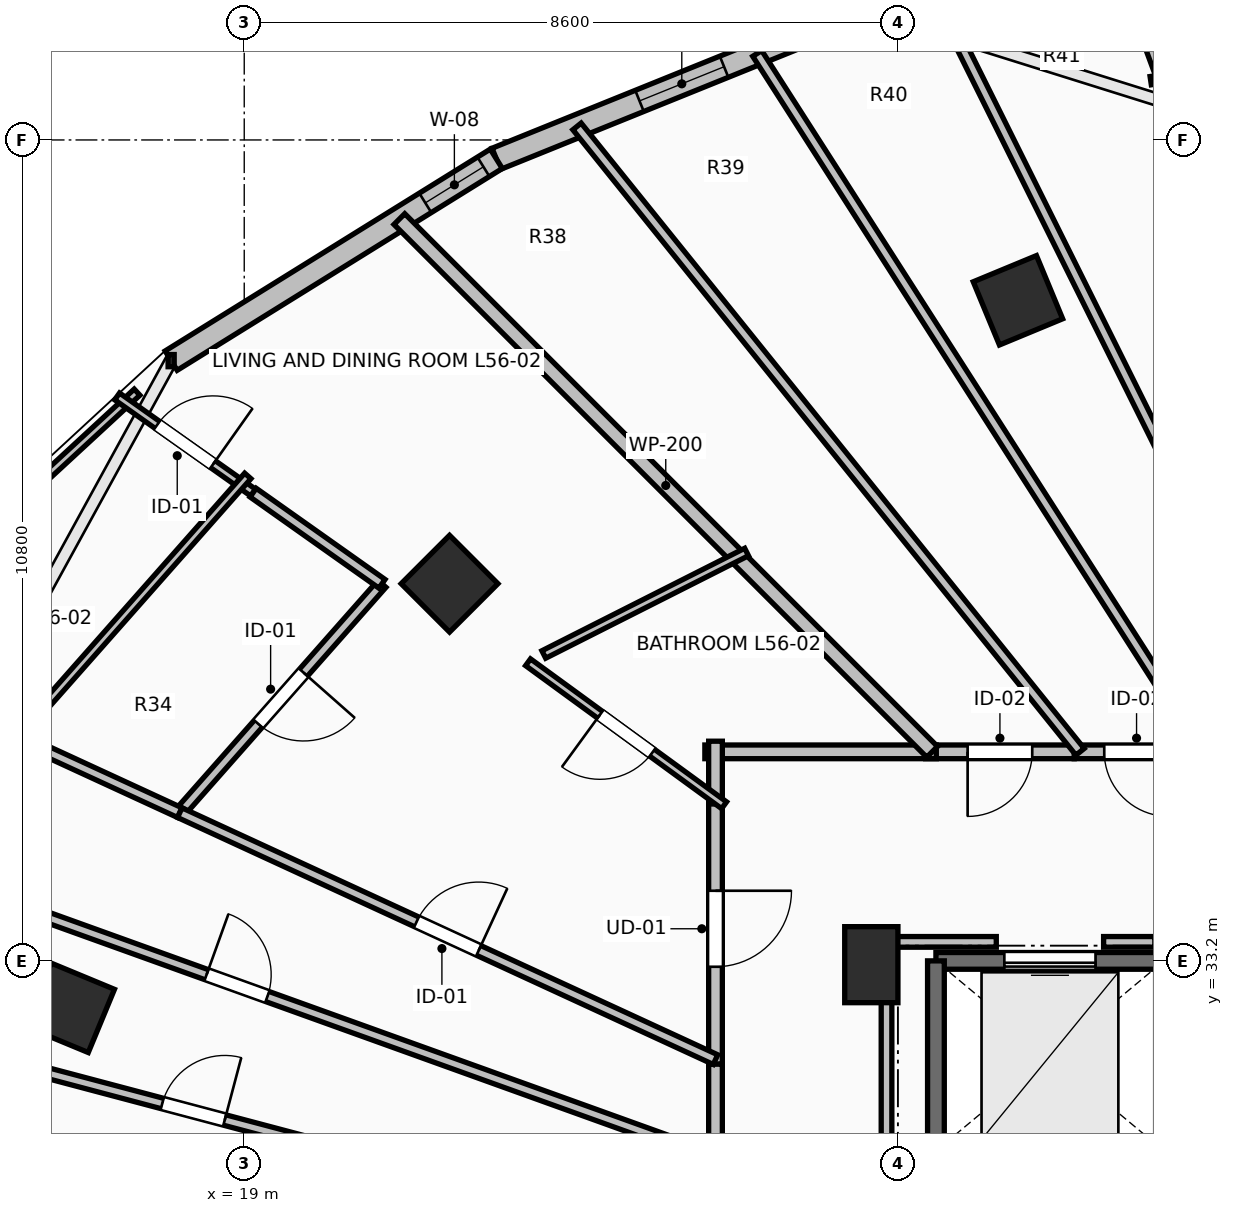
"""IFC4 building model, lengths in metres.
Left out: names, types, materials, properties, quantities, classifications, styles, units other than length and angle.
Written with IfcOpenShell. Run it as: python <this file> out.ifc"""

import sys

from ifc_helpers import new_model, si_unit, direction, frame, frame_2d, origin, origin_2d, place, context, subcontext, project, spatial, rectangle, extrude, element, fill, save


model = new_model("IFC4")
c1 = context("Model", 3, precision=1e-05, world=origin(), true_north=direction((0.0, 1.0)))
c2 = subcontext(c1, "Body", "Model", "MODEL_VIEW")
j1 = project(units=[si_unit("LENGTHUNIT", "METRE"), si_unit("PLANEANGLEUNIT", "RADIAN")], contexts=[c1])
p1 = place(None, origin())
s1 = spatial("IfcSite", under=j1, at=p1, CompositionType="ELEMENT")
p2 = place(p1, origin())
s2 = spatial("IfcBuilding", under=s1, at=p2, CompositionType="ELEMENT")
p3 = place(p2, frame((0.0, 0.0, 207.2)))
s3 = spatial("IfcBuildingStorey", under=s2, at=p3, CompositionType="ELEMENT", Elevation=207.2)
for number, where, z_axis, x_axis in (
    (1, (29.179, 41.891, 0.0), (0.0, 0.0, 1.0), (-0.383, 0.924, 0.0)),
    (2, (21.701, 38.162, 0.0), (0.0, 0.0, 1.0), (-0.707, 0.707, 0.0)),
    (3, (16.705, 32.582, 0.0), (0.0, 0.0, 1.0), (-0.924, 0.383, 0.0)),
):
    element("IfcColumn", number, at=place(p3, frame(where, z_axis=z_axis, x_axis=x_axis)), inside=s3, PredefinedType="COLUMN", context=c2, shape_type="SweptSolid", body=[
        extrude(rectangle(XDim=0.9, YDim=0.9, at=origin_2d()), origin(), (0.0, 0.0, 1.0), 3.55),
    ])
p4 = place(p3, frame((27.25, 33.15, 0.0), z_axis=(0.0, 0.0, 1.0), x_axis=(1.0, 0.0, 0.0)))
e4 = element("IfcColumn", 4, at=p4, inside=s3, PredefinedType="PILASTER", context=c2, shape_type="SweptSolid", body=[
    extrude(rectangle(XDim=0.7, YDim=1.0, at=origin_2d()), origin(), (0.0, 0.0, 1.0), 3.55),
])
p5 = place(p3, frame((27.197, 45.725, 0.0), z_axis=(0.0, 0.0, 1.0), x_axis=(-0.927111094334, -0.374786630981, 0.0)))
e5 = element("IfcWall", 5, at=p5, inside=s3, PredefinedType="STANDARD", context=c2, shape_type="SweptSolid", body=[
    extrude(rectangle(XDim=5.264, YDim=0.3, at=frame_2d((2.632, 0.0))), origin(), (0.0, 0.0, 1.0), 3.29),
])
p6 = place(p5, frame((0.258, 0.0, 0.85)))
e6 = element("IfcOpeningElement", 6, at=p6, cuts=e5, PredefinedType="OPENING", context=c2, shape_type="SweptSolid", body=[
    extrude(rectangle(XDim=0.9, YDim=1.8, at=frame_2d((0.45, 0.9))), frame((0.0, 0.165, 0.0), z_axis=(0.0, -1.0, 0.0), x_axis=(1.0, 0.0, 0.0)), (0.0, 0.0, 1.0), 0.33),
])
p7 = place(p5, frame((2.032, 0.0, 0.85)))
e7 = element("IfcOpeningElement", 7, at=p7, cuts=e5, PredefinedType="OPENING", context=c2, shape_type="SweptSolid", body=[
    extrude(rectangle(XDim=1.2, YDim=1.95, at=frame_2d((0.6, 0.975))), frame((0.0, 0.165, 0.0), z_axis=(0.0, -1.0, 0.0), x_axis=(1.0, 0.0, 0.0)), (0.0, 0.0, 1.0), 0.33),
])
p8 = place(p3, frame((22.316, 43.752, 0.0), z_axis=(0.0, 0.0, 1.0), x_axis=(-0.849647657754, -0.527350791858, 0.0)))
e8 = element("IfcWall", 8, at=p8, inside=s3, PredefinedType="STANDARD", context=c2, shape_type="SweptSolid", body=[
    extrude(rectangle(XDim=5.035, YDim=0.3, at=frame_2d((2.518, 0.0))), origin(), (0.0, 0.0, 1.0), 3.29),
])
p9 = place(p8, frame((0.199, 0.0, 0.85)))
e9 = element("IfcOpeningElement", 9, at=p9, cuts=e8, PredefinedType="OPENING", context=c2, shape_type="SweptSolid", body=[
    extrude(rectangle(XDim=0.9, YDim=1.8, at=frame_2d((0.45, 0.9))), frame((0.0, 0.165, 0.0), z_axis=(0.0, -1.0, 0.0), x_axis=(1.0, 0.0, 0.0)), (0.0, 0.0, 1.0), 0.33),
])
p10 = place(p3, frame((31.1, 33.2, 0.0), z_axis=(0.0, 0.0, 1.0), x_axis=(-1.0, 0.0, 0.0)))
e10 = element("IfcWall", 10, at=p10, inside=s3, PredefinedType="SOLIDWALL", context=c2, shape_type="SweptSolid", body=[
    extrude(rectangle(XDim=3.0, YDim=0.22, at=frame_2d((1.5, 0.0))), origin(), (0.0, 0.0, 1.0), 3.29),
])
p11 = place(p10, frame((0.9, 0.0, 0.0)))
e11 = element("IfcOpeningElement", 11, at=p11, cuts=e10, PredefinedType="OPENING", context=c2, shape_type="SweptSolid", body=[
    extrude(rectangle(XDim=1.2, YDim=2.2, at=frame_2d((0.6, 1.1))), frame((0.0, 0.125, 0.0), z_axis=(0.0, -1.0, 0.0), x_axis=(1.0, 0.0, 0.0)), (0.0, 0.0, 1.0), 0.25),
])
p12 = place(p3, frame((28.1, 33.2, 0.0), z_axis=(0.0, 0.0, 1.0), x_axis=(0.0, -1.0, 0.0)))
e12 = element("IfcWall", 12, at=p12, inside=s3, PredefinedType="SOLIDWALL", context=c2, shape_type="SweptSolid", body=[
    extrude(rectangle(XDim=2.5, YDim=0.22, at=frame_2d((1.25, 0.0))), origin(), (0.0, 0.0, 1.0), 3.29),
])
p13 = place(p3, frame((31.56, 35.95, 0.0), z_axis=(0.0, 0.0, 1.0), x_axis=(-1.0, 0.0, 0.0)))
e13 = element("IfcWall", 13, at=p13, inside=s3, PredefinedType="PARTITIONING", context=c2, shape_type="SweptSolid", body=[
    extrude(rectangle(XDim=1.641, YDim=0.18, at=frame_2d((0.821, 0.0))), origin(), (0.0, 0.0, 1.0), 2.482),
])
p14 = place(p13, frame((0.396, 0.0, 0.0)))
e14 = element("IfcOpeningElement", 14, at=p14, cuts=e13, PredefinedType="OPENING", context=c2, shape_type="SweptSolid", body=[
    extrude(rectangle(XDim=0.85, YDim=2.1, at=frame_2d((0.425, 1.05))), frame((0.0, 0.105, 0.0), z_axis=(0.0, -1.0, 0.0), x_axis=(1.0, 0.0, 0.0)), (0.0, 0.0, 1.0), 0.21),
])
p15 = place(p3, frame((29.919, 35.95, 0.0), z_axis=(0.0, 0.0, 1.0), x_axis=(-1.0, 0.0, 0.0)))
e15 = element("IfcWall", 15, at=p15, inside=s3, PredefinedType="PARTITIONING", context=c2, shape_type="SweptSolid", body=[
    extrude(rectangle(XDim=1.954, YDim=0.18, at=frame_2d((0.977, 0.0))), origin(), (0.0, 0.0, 1.0), 2.482),
])
p16 = place(p15, frame((0.552, 0.0, 0.0)))
e16 = element("IfcOpeningElement", 16, at=p16, cuts=e15, PredefinedType="OPENING", context=c2, shape_type="SweptSolid", body=[
    extrude(rectangle(XDim=0.85, YDim=2.1, at=frame_2d((0.425, 1.05))), frame((0.0, 0.105, 0.0), z_axis=(0.0, -1.0, 0.0), x_axis=(1.0, 0.0, 0.0)), (0.0, 0.0, 1.0), 0.21),
])
p17 = place(p3, frame((25.2, 35.404, 0.0), z_axis=(0.0, 0.0, 1.0), x_axis=(0.0, -1.0, 0.0)))
e17 = element("IfcWall", 17, at=p17, inside=s3, PredefinedType="PARTITIONING", context=c2, shape_type="SweptSolid", body=[
    extrude(rectangle(XDim=3.563, YDim=0.18, at=frame_2d((1.781, 0.0))), origin(), (0.0, 0.0, 1.0), 2.482),
])
p18 = place(p17, frame((1.281, 0.0, 0.0)))
e18 = element("IfcOpeningElement", 18, at=p18, cuts=e17, PredefinedType="OPENING", context=c2, shape_type="SweptSolid", body=[
    extrude(rectangle(XDim=1.0, YDim=2.15, at=frame_2d((0.5, 1.075))), frame((0.0, 0.105, 0.0), z_axis=(0.0, -1.0, 0.0), x_axis=(1.0, 0.0, 0.0)), (0.0, 0.0, 1.0), 0.21),
])
p19 = place(p3, frame((28.105, 35.95, 0.0), z_axis=(0.0, 0.0, 1.0), x_axis=(-1.0, 0.0, 0.0)))
e19 = element("IfcWall", 19, at=p19, inside=s3, PredefinedType="PARTITIONING", context=c2, shape_type="SweptSolid", body=[
    extrude(rectangle(XDim=3.045, YDim=0.18, at=frame_2d((1.522, 0.0))), origin(), (0.0, 0.0, 1.0), 2.482),
])
p20 = place(p3, frame((25.2, 36.09, 0.0), z_axis=(0.0, 0.0, 1.0), x_axis=(0.0, -1.0, 0.0)))
e20 = element("IfcWall", 20, at=p20, inside=s3, PredefinedType="PARTITIONING", context=c2, shape_type="SweptSolid", body=[
    extrude(rectangle(XDim=0.826, YDim=0.18, at=frame_2d((0.413, 0.0))), origin(), (0.0, 0.0, 1.0), 2.482),
])
p21 = place(p3, frame((25.2, 31.841, 0.0), z_axis=(0.0, 0.0, 1.0), x_axis=(0.0, -1.0, 0.0)))
e21 = element("IfcWall", 21, at=p21, inside=s3, PredefinedType="PARTITIONING", context=c2, shape_type="SweptSolid", body=[
    extrude(rectangle(XDim=1.293, YDim=0.18, at=frame_2d((0.646, 0.0))), origin(), (0.0, 0.0, 1.0), 3.29),
])
p22 = place(p3, frame((34.824, 45.367, 0.0), z_axis=(0.0, 0.0, 1.0), x_axis=(-0.988877230123, -0.148734070555, 0.0)))
e22 = element("IfcWall", 22, at=p22, inside=s3, PredefinedType="PARTITIONING", context=c2, shape_type="SweptSolid", body=[
    extrude(rectangle(XDim=3.943, YDim=0.11, at=frame_2d((1.971, 0.0))), origin(), (0.0, 0.0, 1.0), 3.29),
])
p23 = place(p22, frame((1.521, 0.0, 0.0)))
e23 = element("IfcOpeningElement", 23, at=p23, cuts=e22, PredefinedType="OPENING", context=c2, shape_type="SweptSolid", body=[
    extrude(rectangle(XDim=0.9, YDim=2.1, at=frame_2d((0.45, 1.05))), frame((0.0, 0.07, 0.0), z_axis=(0.0, -1.0, 0.0), x_axis=(1.0, 0.0, 0.0)), (0.0, 0.0, 1.0), 0.14),
])
p24 = place(p3, frame((31.113, 44.67, 0.0), z_axis=(0.0, 0.0, 1.0), x_axis=(-0.346337161188, 0.938110105894, 0.0)))
e24 = element("IfcWall", 24, at=p24, inside=s3, PredefinedType="PARTITIONING", context=c2, shape_type="SweptSolid", body=[
    extrude(rectangle(XDim=2.059, YDim=0.11, at=frame_2d((1.03, 0.0))), origin(), (0.0, 0.0, 1.0), 3.29),
])
p25 = place(p3, frame((28.091, 45.928, 0.0), z_axis=(0.0, 0.0, 1.0), x_axis=(0.445267068418, -0.895397809793, 0.0)))
e25 = element("IfcWall", 25, at=p25, inside=s3, PredefinedType="PARTITIONING", context=c2, shape_type="SweptSolid", body=[
    extrude(rectangle(XDim=11.144, YDim=0.14, at=frame_2d((5.572, 0.0))), origin(), (0.0, 0.0, 1.0), 2.482),
])
p26 = place(p3, frame((25.749, 45.138, 0.0), z_axis=(0.0, 0.0, 1.0), x_axis=(0.539168632786, -0.842197830335, 0.0)))
e26 = element("IfcWall", 26, at=p26, inside=s3, PredefinedType="PARTITIONING", context=c2, shape_type="SweptSolid", body=[
    extrude(rectangle(XDim=10.909, YDim=0.14, at=frame_2d((5.455, 0.0))), origin(), (0.0, 0.0, 1.0), 2.482),
])
p27 = place(p3, frame((23.378, 44.178, 0.0), z_axis=(0.0, 0.0, 1.0), x_axis=(0.626756813732, -0.779214923137, 0.0)))
e27 = element("IfcWall", 27, at=p27, inside=s3, PredefinedType="PARTITIONING", context=c2, shape_type="SweptSolid", body=[
    extrude(rectangle(XDim=10.559, YDim=0.14, at=frame_2d((5.28, 0.0))), origin(), (0.0, 0.0, 1.0), 2.482),
])
p28 = place(p3, frame((21.041, 42.959, 0.0), z_axis=(0.0, 0.0, 1.0), x_axis=(0.707106781187, -0.707106781187, 0.0)))
e28 = element("IfcWall", 28, at=p28, inside=s3, PredefinedType="PARTITIONING", context=c2, shape_type="SweptSolid", body=[
    extrude(rectangle(XDim=9.912, YDim=0.2, at=frame_2d((4.956, 0.0))), origin(), (0.0, 0.0, 1.0), 2.482),
])
p29 = place(p3, frame((25.313, 35.248, 0.0), z_axis=(0.0, 0.0, 1.0), x_axis=(-0.807968083988, 0.58922625133, 0.0)))
e29 = element("IfcWall", 29, at=p29, inside=s3, PredefinedType="PARTITIONING", context=c2, shape_type="SweptSolid", body=[
    extrude(rectangle(XDim=3.192, YDim=0.11, at=frame_2d((1.596, 0.0))), origin(), (0.0, 0.0, 1.0), 2.482),
])
p30 = place(p29, frame((1.171, 0.0, 0.0)))
e30 = element("IfcOpeningElement", 30, at=p30, cuts=e29, PredefinedType="OPENING", context=c2, shape_type="SweptSolid", body=[
    extrude(rectangle(XDim=0.85, YDim=2.1, at=frame_2d((0.425, 1.05))), frame((0.0, 0.07, 0.0), z_axis=(0.0, -1.0, 0.0), x_axis=(1.0, 0.0, 0.0)), (0.0, 0.0, 1.0), 0.14),
])
p31 = place(p3, frame((22.941, 37.231, 0.0), z_axis=(0.0, 0.0, 1.0), x_axis=(0.892507731149, 0.451032094024, 0.0)))
e31 = element("IfcWall", 31, at=p31, inside=s3, PredefinedType="PARTITIONING", context=c2, shape_type="SweptSolid", body=[
    extrude(rectangle(XDim=2.989, YDim=0.11, at=frame_2d((1.495, 0.0))), origin(), (0.0, 0.0, 1.0), 2.482),
])
p32 = place(p3, frame((17.59, 40.682, 0.0), z_axis=(0.0, 0.0, 1.0), x_axis=(-0.734861902375, -0.678216768031, 0.0)))
e32 = element("IfcWall", 32, at=p32, inside=s3, PredefinedType="PARTITIONING", context=c2, shape_type="SweptSolid", body=[
    extrude(rectangle(XDim=4.323, YDim=0.11, at=frame_2d((2.162, 0.0))), origin(), (0.0, 0.0, 1.0), 3.29),
])
p33 = place(p3, frame((17.328, 40.626, 0.0), z_axis=(0.0, 0.0, 1.0), x_axis=(0.816448938693, -0.577417639588, 0.0)))
e33 = element("IfcWall", 33, at=p33, inside=s3, PredefinedType="PARTITIONING", context=c2, shape_type="SweptSolid", body=[
    extrude(rectangle(XDim=2.192, YDim=0.11, at=frame_2d((1.096, 0.0))), origin(), (0.0, 0.0, 1.0), 3.29),
])
p34 = place(p33, frame((0.646, 0.0, 0.0)))
e34 = element("IfcOpeningElement", 34, at=p34, cuts=e33, PredefinedType="OPENING", context=c2, shape_type="SweptSolid", body=[
    extrude(rectangle(XDim=0.9, YDim=2.1, at=frame_2d((0.45, 1.05))), frame((0.0, 0.07, 0.0), z_axis=(0.0, -1.0, 0.0), x_axis=(1.0, 0.0, 0.0)), (0.0, 0.0, 1.0), 0.14),
])
p35 = place(p3, frame((20.812, 38.161, 0.0), z_axis=(0.0, 0.0, 1.0), x_axis=(-0.662063683649, -0.749447582418, 0.0)))
e35 = element("IfcWall", 35, at=p35, inside=s3, PredefinedType="PARTITIONING", context=c2, shape_type="SweptSolid", body=[
    extrude(rectangle(XDim=4.018, YDim=0.14, at=frame_2d((2.009, 0.0))), origin(), (0.0, 0.0, 1.0), 3.29),
])
p36 = place(p35, frame((1.559, 0.0, 0.0)))
e36 = element("IfcOpeningElement", 36, at=p36, cuts=e35, PredefinedType="OPENING", context=c2, shape_type="SweptSolid", body=[
    extrude(rectangle(XDim=0.9, YDim=2.1, at=frame_2d((0.45, 1.05))), frame((0.0, 0.085, 0.0), z_axis=(0.0, -1.0, 0.0), x_axis=(1.0, 0.0, 0.0)), (0.0, 0.0, 1.0), 0.17),
])
p37 = place(p3, frame((18.152, 35.15, 0.0), z_axis=(0.0, 0.0, 1.0), x_axis=(-0.908192094718, 0.418553603607, 0.0)))
e37 = element("IfcWall", 37, at=p37, inside=s3, PredefinedType="PARTITIONING", context=c2, shape_type="SweptSolid", body=[
    extrude(rectangle(XDim=2.363, YDim=0.14, at=frame_2d((1.182, 0.0))), origin(), (0.0, 0.0, 1.0), 3.29),
])
p38 = place(p3, frame((19.117, 39.36, 0.0), z_axis=(0.0, 0.0, 1.0), x_axis=(0.816315567802, -0.577606175316, 0.0)))
e38 = element("IfcWall", 38, at=p38, inside=s3, PredefinedType="PARTITIONING", context=c2, shape_type="SweptSolid", body=[
    extrude(rectangle(XDim=2.076, YDim=0.14, at=frame_2d((1.038, 0.0))), origin(), (0.0, 0.0, 1.0), 3.29),
])
p39 = place(p3, frame((18.152, 35.15, 0.0), z_axis=(0.0, 0.0, 1.0), x_axis=(0.908152637685, -0.418639208227, 0.0)))
e39 = element("IfcWall", 39, at=p39, inside=s3, PredefinedType="PARTITIONING", context=c2, shape_type="SweptSolid", body=[
    extrude(rectangle(XDim=7.761, YDim=0.14, at=frame_2d((3.88, 0.0))), origin(), (0.0, 0.0, 1.0), 2.824),
])
p40 = place(p39, frame((3.43, 0.0, 0.0)))
e40 = element("IfcOpeningElement", 40, at=p40, cuts=e39, PredefinedType="OPENING", context=c2, shape_type="SweptSolid", body=[
    extrude(rectangle(XDim=0.9, YDim=2.1, at=frame_2d((0.45, 1.05))), frame((0.0, 0.085, 0.0), z_axis=(0.0, -1.0, 0.0), x_axis=(1.0, 0.0, 0.0)), (0.0, 0.0, 1.0), 0.17),
])
p41 = place(p3, frame((15.913, 36.034, 0.0), z_axis=(0.0, 0.0, 1.0), x_axis=(0.662189711464, 0.749336230294, 0.0)))
e41 = element("IfcWall", 41, at=p41, inside=s3, PredefinedType="PARTITIONING", context=c2, shape_type="SweptSolid", body=[
    extrude(rectangle(XDim=4.732, YDim=0.11, at=frame_2d((2.366, 0.0))), origin(), (0.0, 0.0, 1.0), 3.29),
])
p42 = place(p3, frame((12.609, 35.141, 0.0), z_axis=(0.0, 0.0, 1.0), x_axis=(0.940877411069, -0.338747246985, 0.0)))
e42 = element("IfcWall", 42, at=p42, inside=s3, PredefinedType="PARTITIONING", context=c2, shape_type="SweptSolid", body=[
    extrude(rectangle(XDim=13.382, YDim=0.14, at=frame_2d((6.691, 0.0))), origin(), (0.0, 0.0, 1.0), 2.824),
])
p43 = place(p42, frame((6.266, 0.0, 0.0)))
e43 = element("IfcOpeningElement", 43, at=p43, cuts=e42, PredefinedType="OPENING", context=c2, shape_type="SweptSolid", body=[
    extrude(rectangle(XDim=0.85, YDim=2.1, at=frame_2d((0.425, 1.05))), frame((0.0, 0.085, 0.0), z_axis=(0.0, -1.0, 0.0), x_axis=(1.0, 0.0, 0.0)), (0.0, 0.0, 1.0), 0.17),
])
p44 = place(p3, frame((11.465, 33.036, 0.0), z_axis=(0.0, 0.0, 1.0), x_axis=(0.966598137313, -0.256296782934, 0.0)))
e44 = element("IfcWall", 44, at=p44, inside=s3, PredefinedType="PARTITIONING", context=c2, shape_type="SweptSolid", body=[
    extrude(rectangle(XDim=14.209, YDim=0.14, at=frame_2d((7.105, 0.0))), origin(), (0.0, 0.0, 1.0), 2.482),
])
p45 = place(p44, frame((6.68, 0.0, 0.0)))
e45 = element("IfcOpeningElement", 45, at=p45, cuts=e44, PredefinedType="OPENING", context=c2, shape_type="SweptSolid", body=[
    extrude(rectangle(XDim=0.85, YDim=2.1, at=frame_2d((0.425, 1.05))), frame((0.0, 0.085, 0.0), z_axis=(0.0, -1.0, 0.0), x_axis=(1.0, 0.0, 0.0)), (0.0, 0.0, 1.0), 0.17),
])
p46 = place(p3, frame((30.98, 33.45, 0.0), z_axis=(0.0, 0.0, 1.0), x_axis=(-1.0, 0.0, 0.0)))
e46 = element("IfcWall", 46, at=p46, inside=s3, PredefinedType="PARTITIONING", context=c2, shape_type="SweptSolid", body=[
    extrude(rectangle(XDim=0.674, YDim=0.14, at=frame_2d((0.337, 0.0))), origin(), (0.0, 0.0, 1.0), 3.29),
])
p47 = place(p3, frame((28.894, 33.45, 0.0), z_axis=(0.0, 0.0, 1.0), x_axis=(-1.0, 0.0, 0.0)))
e47 = element("IfcWall", 47, at=p47, inside=s3, PredefinedType="PARTITIONING", context=c2, shape_type="SweptSolid", body=[
    extrude(rectangle(XDim=1.444, YDim=0.14, at=frame_2d((0.722, 0.0))), origin(), (0.0, 0.0, 1.0), 2.482),
])
p48 = place(p3, frame((27.45, 33.45, 0.0), z_axis=(0.0, 0.0, 1.0), x_axis=(0.0, -1.0, 0.0)))
e48 = element("IfcWall", 48, at=p48, inside=s3, PredefinedType="PARTITIONING", context=c2, shape_type="SweptSolid", body=[
    extrude(rectangle(XDim=5.254, YDim=0.14, at=frame_2d((2.627, 0.0))), origin(), (0.0, 0.0, 1.0), 2.482),
])
p49 = place(p7, origin())
e49 = element("IfcWindow", 49, at=p49, inside=s3, PartitioningType="SINGLE_PANEL", PredefinedType="WINDOW", context=c2, shape_type="SweptSolid", body=[
    extrude(rectangle(XDim=1.2, YDim=1.95, at=frame_2d((0.6, 0.975))), frame((0.0, 0.03, 0.0), z_axis=(0.0, -1.0, 0.0), x_axis=(1.0, 0.0, 0.0)), (0.0, 0.0, 1.0), 0.06),
])
fill(e7, e49)
p50 = place(p9, origin())
e50 = element("IfcWindow", 50, at=p50, inside=s3, PartitioningType="SINGLE_PANEL", PredefinedType="WINDOW", context=c2, shape_type="SweptSolid", body=[
    extrude(rectangle(XDim=0.9, YDim=1.8, at=frame_2d((0.45, 0.9))), frame((0.0, 0.03, 0.0), z_axis=(0.0, -1.0, 0.0), x_axis=(1.0, 0.0, 0.0)), (0.0, 0.0, 1.0), 0.06),
])
fill(e9, e50)
p51 = place(p11, origin())
e51 = element("IfcDoor", 51, at=p51, inside=s3, OperationType="SLIDING_TO_LEFT", PredefinedType="DOOR", context=c2, shape_type="SweptSolid", body=[
    extrude(rectangle(XDim=1.2, YDim=2.2, at=frame_2d((0.6, 1.1))), frame((0.0, 0.025, 0.0), z_axis=(0.0, -1.0, 0.0), x_axis=(1.0, 0.0, 0.0)), (0.0, 0.0, 1.0), 0.05),
])
fill(e11, e51)
p52 = place(p18, origin())
e52 = element("IfcDoor", 52, at=p52, inside=s3, OperationType="SINGLE_SWING_LEFT", PredefinedType="DOOR", context=c2, shape_type="SweptSolid", body=[
    extrude(rectangle(XDim=1.0, YDim=2.15, at=frame_2d((0.5, 1.075))), frame((0.0, 0.025, 0.0), z_axis=(0.0, -1.0, 0.0), x_axis=(1.0, 0.0, 0.0)), (0.0, 0.0, 1.0), 0.05),
])
fill(e18, e52)
p53 = place(p30, origin())
e53 = element("IfcDoor", 53, at=p53, inside=s3, OperationType="SINGLE_SWING_RIGHT", PredefinedType="DOOR", context=c2, shape_type="SweptSolid", body=[
    extrude(rectangle(XDim=0.85, YDim=2.1, at=frame_2d((0.425, 1.05))), frame((0.0, 0.025, 0.0), z_axis=(0.0, -1.0, 0.0), x_axis=(1.0, 0.0, 0.0)), (0.0, 0.0, 1.0), 0.05),
])
fill(e30, e53)
p54 = place(p34, origin())
e54 = element("IfcDoor", 54, at=p54, inside=s3, OperationType="SINGLE_SWING_RIGHT", PredefinedType="DOOR", context=c2, shape_type="SweptSolid", body=[
    extrude(rectangle(XDim=0.9, YDim=2.1, at=frame_2d((0.45, 1.05))), frame((0.0, 0.025, 0.0), z_axis=(0.0, -1.0, 0.0), x_axis=(1.0, 0.0, 0.0)), (0.0, 0.0, 1.0), 0.05),
])
fill(e34, e54)
p55 = place(p36, origin())
e55 = element("IfcDoor", 55, at=p55, inside=s3, OperationType="SINGLE_SWING_LEFT", PredefinedType="DOOR", context=c2, shape_type="SweptSolid", body=[
    extrude(rectangle(XDim=0.9, YDim=2.1, at=frame_2d((0.45, 1.05))), frame((0.0, 0.025, 0.0), z_axis=(0.0, -1.0, 0.0), x_axis=(1.0, 0.0, 0.0)), (0.0, 0.0, 1.0), 0.05),
])
fill(e36, e55)
p56 = place(p40, origin())
e56 = element("IfcDoor", 56, at=p56, inside=s3, OperationType="SINGLE_SWING_RIGHT", PredefinedType="DOOR", context=c2, shape_type="SweptSolid", body=[
    extrude(rectangle(XDim=0.9, YDim=2.1, at=frame_2d((0.45, 1.05))), frame((0.0, 0.025, 0.0), z_axis=(0.0, -1.0, 0.0), x_axis=(1.0, 0.0, 0.0)), (0.0, 0.0, 1.0), 0.05),
])
fill(e40, e56)
p57 = place(p14, origin())
e57 = element("IfcDoor", 57, at=p57, inside=s3, OperationType="SINGLE_SWING_LEFT", PredefinedType="DOOR", context=c2, shape_type="SweptSolid", body=[
    extrude(rectangle(XDim=0.85, YDim=2.1, at=frame_2d((0.425, 1.05))), frame((0.0, 0.025, 0.0), z_axis=(0.0, -1.0, 0.0), x_axis=(1.0, 0.0, 0.0)), (0.0, 0.0, 1.0), 0.05),
])
fill(e14, e57)
p58 = place(p16, origin())
e58 = element("IfcDoor", 58, at=p58, inside=s3, OperationType="SINGLE_SWING_RIGHT", PredefinedType="DOOR", context=c2, shape_type="SweptSolid", body=[
    extrude(rectangle(XDim=0.85, YDim=2.1, at=frame_2d((0.425, 1.05))), frame((0.0, 0.025, 0.0), z_axis=(0.0, -1.0, 0.0), x_axis=(1.0, 0.0, 0.0)), (0.0, 0.0, 1.0), 0.05),
])
fill(e16, e58)
p59 = place(p43, origin())
e59 = element("IfcDoor", 59, at=p59, inside=s3, OperationType="SINGLE_SWING_LEFT", PredefinedType="DOOR", context=c2, shape_type="SweptSolid", body=[
    extrude(rectangle(XDim=0.85, YDim=2.1, at=frame_2d((0.425, 1.05))), frame((0.0, 0.025, 0.0), z_axis=(0.0, -1.0, 0.0), x_axis=(1.0, 0.0, 0.0)), (0.0, 0.0, 1.0), 0.05),
])
fill(e43, e59)
p60 = place(p45, origin())
e60 = element("IfcDoor", 60, at=p60, inside=s3, OperationType="SINGLE_SWING_RIGHT", PredefinedType="DOOR", context=c2, shape_type="SweptSolid", body=[
    extrude(rectangle(XDim=0.85, YDim=2.1, at=frame_2d((0.425, 1.05))), frame((0.0, 0.025, 0.0), z_axis=(0.0, -1.0, 0.0), x_axis=(1.0, 0.0, 0.0)), (0.0, 0.0, 1.0), 0.05),
])
fill(e45, e60)
save(model, sys.argv[1])
